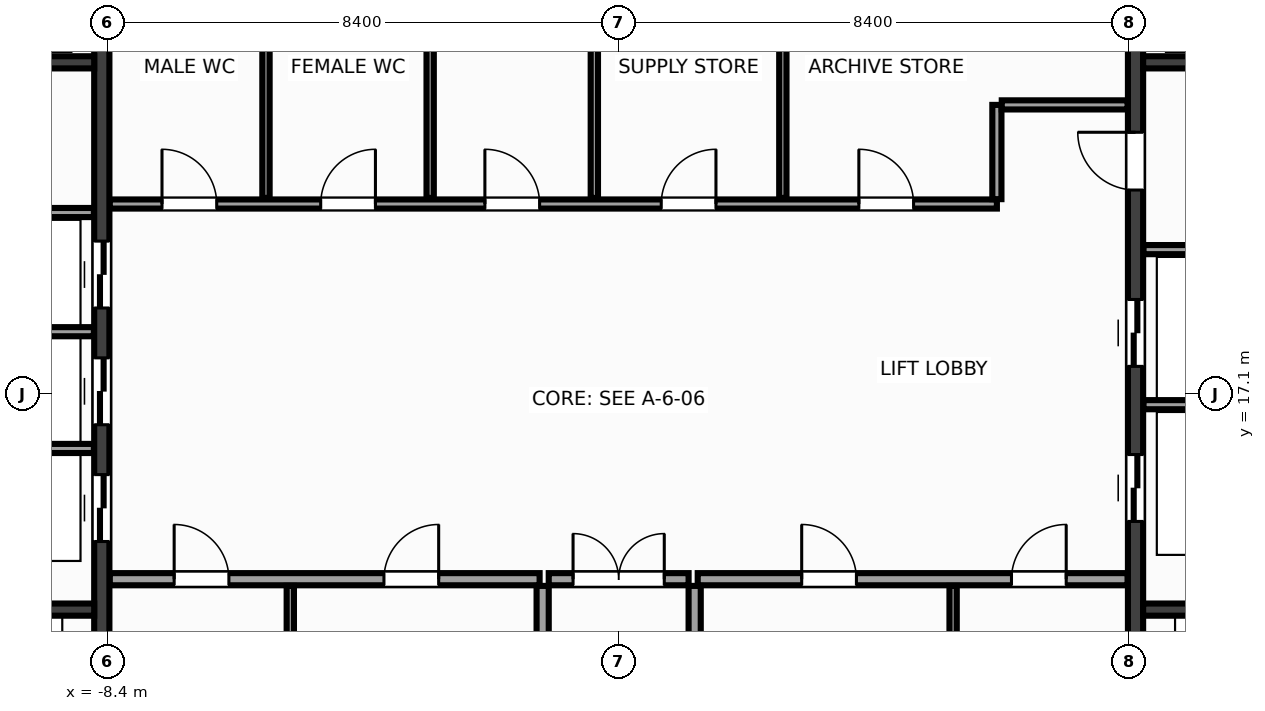
"""IFC4 building model, lengths in metres.
Left out: names, types, materials, properties, quantities, classifications, styles, units other than length and angle.
Written with IfcOpenShell. Run it as: python <this file> out.ifc"""

import sys

from ifc_helpers import new_model, si_unit, direction, frame, frame_2d, origin, place, context, subcontext, project, spatial, rectangle, extrude, source, transform, mapped, element, fill, save


model = new_model("IFC4")
c1 = context("Model", 3, precision=1e-05, world=origin(), true_north=direction((0.0, 1.0)))
c2 = subcontext(c1, "Body", "Model", "MODEL_VIEW")
j1 = project(units=[si_unit("LENGTHUNIT", "METRE"), si_unit("PLANEANGLEUNIT", "RADIAN")], contexts=[c1])
p1 = place(None, origin())
s1 = spatial("IfcSite", under=j1, at=p1, CompositionType="ELEMENT")
p2 = place(p1, origin())
s2 = spatial("IfcBuilding", under=s1, at=p2, CompositionType="ELEMENT")
p3 = place(p2, frame((0.0, 0.0, 286.4)))
s3 = spatial("IfcBuildingStorey", under=s2, at=p3, CompositionType="ELEMENT", Elevation=286.4)
m1 = source(origin(), c2, "Body", "SweptSolid", [
    extrude(rectangle(XDim=13.1, YDim=0.25, at=frame_2d((6.55, 0.0))), origin(), (0.0, 0.0, 1.0), 3.6),
])
p4 = place(p3, frame((-8.5, 10.45, 0.0), z_axis=(0.0, 0.0, 1.0), x_axis=(0.0, 1.0, 0.0)))
e1 = element("IfcWall", 1, at=p4, inside=s3, PredefinedType="SHEAR", context=c2, shape_type="MappedRepresentation", body=[
    mapped(m1, transform((0.0, 0.0, 0.0), x_axis=(1.0, 0.0, 0.0), y_axis=(0.0, 1.0, 0.0), z_axis=(0.0, 0.0, 1.0), scale=1.0)),
])
p5 = place(p4, frame((4.22, 0.0, 0.0)))
e2 = element("IfcOpeningElement", 2, at=p5, cuts=e1, PredefinedType="OPENING", context=c2, shape_type="SweptSolid", body=[
    extrude(rectangle(XDim=1.1, YDim=2.15, at=frame_2d((0.55, 1.075))), frame((0.0, 0.137, 0.0), z_axis=(0.0, -1.0, 0.0), x_axis=(1.0, 0.0, 0.0)), (0.0, 0.0, 1.0), 0.274),
])
p6 = place(p4, frame((6.14, 0.0, 0.0)))
e3 = element("IfcOpeningElement", 3, at=p6, cuts=e1, PredefinedType="OPENING", context=c2, shape_type="SweptSolid", body=[
    extrude(rectangle(XDim=1.1, YDim=2.15, at=frame_2d((0.55, 1.075))), frame((0.0, 0.137, 0.0), z_axis=(0.0, -1.0, 0.0), x_axis=(1.0, 0.0, 0.0)), (0.0, 0.0, 1.0), 0.274),
])
p7 = place(p4, frame((8.06, 0.0, 0.0)))
e4 = element("IfcOpeningElement", 4, at=p7, cuts=e1, PredefinedType="OPENING", context=c2, shape_type="SweptSolid", body=[
    extrude(rectangle(XDim=1.1, YDim=2.15, at=frame_2d((0.55, 1.075))), frame((0.0, 0.137, 0.0), z_axis=(0.0, -1.0, 0.0), x_axis=(1.0, 0.0, 0.0)), (0.0, 0.0, 1.0), 0.274),
])
p8 = place(p3, frame((8.5, 10.45, 0.0), z_axis=(0.0, 0.0, 1.0), x_axis=(0.0, 1.0, 0.0)))
e5 = element("IfcWall", 5, at=p8, inside=s3, PredefinedType="SHEAR", context=c2, shape_type="MappedRepresentation", body=[
    mapped(m1, transform((0.0, 0.0, 0.0), x_axis=(1.0, 0.0, 0.0), y_axis=(0.0, 1.0, 0.0), z_axis=(0.0, 0.0, 1.0), scale=1.0)),
])
p9 = place(p8, frame((4.55, 0.0, 0.0)))
e6 = element("IfcOpeningElement", 6, at=p9, cuts=e5, PredefinedType="OPENING", context=c2, shape_type="SweptSolid", body=[
    extrude(rectangle(XDim=1.1, YDim=2.15, at=frame_2d((0.55, 1.075))), frame((0.0, 0.137, 0.0), z_axis=(0.0, -1.0, 0.0), x_axis=(1.0, 0.0, 0.0)), (0.0, 0.0, 1.0), 0.274),
])
p10 = place(p8, frame((7.1, 0.0, 0.0)))
e7 = element("IfcOpeningElement", 7, at=p10, cuts=e5, PredefinedType="OPENING", context=c2, shape_type="SweptSolid", body=[
    extrude(rectangle(XDim=1.1, YDim=2.15, at=frame_2d((0.55, 1.075))), frame((0.0, 0.137, 0.0), z_axis=(0.0, -1.0, 0.0), x_axis=(1.0, 0.0, 0.0)), (0.0, 0.0, 1.0), 0.274),
])
p11 = place(p8, frame((10.0, 0.0, 0.0)))
e8 = element("IfcOpeningElement", 8, at=p11, cuts=e5, PredefinedType="OPENING", context=c2, shape_type="SweptSolid", body=[
    extrude(rectangle(XDim=0.95, YDim=2.15, at=frame_2d((0.475, 1.075))), frame((0.0, 0.137, 0.0), z_axis=(0.0, -1.0, 0.0), x_axis=(1.0, 0.0, 0.0)), (0.0, 0.0, 1.0), 0.274),
])
m2 = source(origin(), c2, "Body", "SweptSolid", [
    extrude(rectangle(XDim=2.825, YDim=0.2, at=frame_2d((1.413, 0.0))), origin(), (0.0, 0.0, 1.0), 3.6),
])
for number, where, z_axis, x_axis in (
    (9, (-11.45, 13.55, 0.0), (0.0, 0.0, 1.0), (1.0, 0.0, 0.0)),
    (10, (8.625, 13.55, 0.0), (0.0, 0.0, 1.0), (1.0, 0.0, 0.0)),
):
    element("IfcWall", number, at=place(p3, frame(where, z_axis=z_axis, x_axis=x_axis)), inside=s3, PredefinedType="SHEAR", context=c2, shape_type="MappedRepresentation", body=[
        mapped(m2, transform((0.0, 0.0, 0.0), x_axis=(1.0, 0.0, 0.0), y_axis=(0.0, 1.0, 0.0), z_axis=(0.0, 0.0, 1.0), scale=1.0)),
    ])
m3 = source(origin(), c2, "Body", "SweptSolid", [
    extrude(rectangle(XDim=3.02, YDim=0.2, at=frame_2d((1.51, 0.0))), origin(), (0.0, 0.0, 1.0), 3.6),
])
for number, where, z_axis, x_axis in (
    (11, (-11.645, 22.55, 0.0), (0.0, 0.0, 1.0), (1.0, 0.0, 0.0)),
    (12, (8.625, 22.55, 0.0), (0.0, 0.0, 1.0), (1.0, 0.0, 0.0)),
):
    element("IfcWall", number, at=place(p3, frame(where, z_axis=z_axis, x_axis=x_axis)), inside=s3, PredefinedType="SHEAR", context=c2, shape_type="MappedRepresentation", body=[
        mapped(m3, transform((0.0, 0.0, 0.0), x_axis=(1.0, 0.0, 0.0), y_axis=(0.0, 1.0, 0.0), z_axis=(0.0, 0.0, 1.0), scale=1.0)),
    ])
m4 = source(origin(), c2, "Body", "SweptSolid", [
    extrude(rectangle(XDim=3.01, YDim=0.15, at=frame_2d((1.505, 0.0))), origin(), (0.0, 0.0, 1.0), 3.37),
])
for number, where, z_axis, x_axis in (
    (13, (-11.64, 16.2, 0.0), (0.0, 0.0, 1.0), (1.0, 0.0, 0.0)),
    (14, (-11.64, 18.12, 0.0), (0.0, 0.0, 1.0), (1.0, 0.0, 0.0)),
    (15, (-11.64, 20.08, 0.0), (0.0, 0.0, 1.0), (1.0, 0.0, 0.0)),
    (16, (8.63, 16.92, 0.0), (0.0, 0.0, 1.0), (1.0, 0.0, 0.0)),
    (17, (8.63, 19.47, 0.0), (0.0, 0.0, 1.0), (1.0, 0.0, 0.0)),
):
    element("IfcWall", number, at=place(p3, frame(where, z_axis=z_axis, x_axis=x_axis)), inside=s3, PredefinedType="PARTITIONING", context=c2, shape_type="MappedRepresentation", body=[
        mapped(m4, transform((0.0, 0.0, 0.0), x_axis=(1.0, 0.0, 0.0), y_axis=(0.0, 1.0, 0.0), z_axis=(0.0, 0.0, 1.0), scale=1.0)),
    ])
m5 = source(origin(), c2, "Body", "SweptSolid", [
    extrude(rectangle(XDim=7.07, YDim=0.2, at=frame_2d((3.535, 0.0))), origin(), (0.0, 0.0, 1.0), 3.37),
])
p12 = place(p3, frame((-8.37, 14.05, 0.0), z_axis=(0.0, 0.0, 1.0), x_axis=(1.0, 0.0, 0.0)))
e18 = element("IfcWall", 18, at=p12, inside=s3, PredefinedType="PARTITIONING", context=c2, shape_type="MappedRepresentation", body=[
    mapped(m5, transform((0.0, 0.0, 0.0), x_axis=(1.0, 0.0, 0.0), y_axis=(0.0, 1.0, 0.0), z_axis=(0.0, 0.0, 1.0), scale=1.0)),
])
p13 = place(p12, frame((1.06, 0.0, 0.0)))
e19 = element("IfcOpeningElement", 19, at=p13, cuts=e18, PredefinedType="OPENING", context=c2, shape_type="SweptSolid", body=[
    extrude(rectangle(XDim=0.9, YDim=2.15, at=frame_2d((0.45, 1.075))), frame((0.0, 0.112, 0.0), z_axis=(0.0, -1.0, 0.0), x_axis=(1.0, 0.0, 0.0)), (0.0, 0.0, 1.0), 0.224),
])
p14 = place(p12, frame((4.51, 0.0, 0.0)))
e20 = element("IfcOpeningElement", 20, at=p14, cuts=e18, PredefinedType="OPENING", context=c2, shape_type="SweptSolid", body=[
    extrude(rectangle(XDim=0.9, YDim=2.15, at=frame_2d((0.45, 1.075))), frame((0.0, 0.112, 0.0), z_axis=(0.0, -1.0, 0.0), x_axis=(1.0, 0.0, 0.0)), (0.0, 0.0, 1.0), 0.224),
])
p15 = place(p3, frame((1.3, 14.05, 0.0), z_axis=(0.0, 0.0, 1.0), x_axis=(1.0, 0.0, 0.0)))
e21 = element("IfcWall", 21, at=p15, inside=s3, PredefinedType="PARTITIONING", context=c2, shape_type="MappedRepresentation", body=[
    mapped(m5, transform((0.0, 0.0, 0.0), x_axis=(1.0, 0.0, 0.0), y_axis=(0.0, 1.0, 0.0), z_axis=(0.0, 0.0, 1.0), scale=1.0)),
])
p16 = place(p15, frame((1.71, 0.0, 0.0)))
e22 = element("IfcOpeningElement", 22, at=p16, cuts=e21, PredefinedType="OPENING", context=c2, shape_type="SweptSolid", body=[
    extrude(rectangle(XDim=0.9, YDim=2.15, at=frame_2d((0.45, 1.075))), frame((0.0, 0.112, 0.0), z_axis=(0.0, -1.0, 0.0), x_axis=(1.0, 0.0, 0.0)), (0.0, 0.0, 1.0), 0.224),
])
p17 = place(p15, frame((5.16, 0.0, 0.0)))
e23 = element("IfcOpeningElement", 23, at=p17, cuts=e21, PredefinedType="OPENING", context=c2, shape_type="SweptSolid", body=[
    extrude(rectangle(XDim=0.9, YDim=2.15, at=frame_2d((0.45, 1.075))), frame((0.0, 0.112, 0.0), z_axis=(0.0, -1.0, 0.0), x_axis=(1.0, 0.0, 0.0)), (0.0, 0.0, 1.0), 0.224),
])
m6 = source(origin(), c2, "Body", "SweptSolid", [
    extrude(rectangle(XDim=3.49, YDim=0.2, at=frame_2d((1.745, 0.0))), origin(), (0.0, 0.0, 1.0), 3.37),
])
for number, where, z_axis, x_axis in (
    (24, (-1.25, 10.45, 0.0), (0.0, 0.0, 1.0), (0.0, 1.0, 0.0)),
    (25, (1.25, 10.45, 0.0), (0.0, 0.0, 1.0), (0.0, 1.0, 0.0)),
):
    element("IfcWall", number, at=place(p3, frame(where, z_axis=z_axis, x_axis=x_axis)), inside=s3, PredefinedType="PARTITIONING", context=c2, shape_type="MappedRepresentation", body=[
        mapped(m6, transform((0.0, 0.0, 0.0), x_axis=(1.0, 0.0, 0.0), y_axis=(0.0, 1.0, 0.0), z_axis=(0.0, 0.0, 1.0), scale=1.0)),
    ])
m7 = source(origin(), c2, "Body", "SweptSolid", [
    extrude(rectangle(XDim=2.3, YDim=0.2, at=frame_2d((1.15, 0.0))), origin(), (0.0, 0.0, 1.0), 3.37),
])
p18 = place(p3, frame((-1.15, 14.05, 0.0), z_axis=(0.0, 0.0, 1.0), x_axis=(1.0, 0.0, 0.0)))
e26 = element("IfcWall", 26, at=p18, inside=s3, PredefinedType="PARTITIONING", context=c2, shape_type="MappedRepresentation", body=[
    mapped(m7, transform((0.0, 0.0, 0.0), x_axis=(1.0, 0.0, 0.0), y_axis=(0.0, 1.0, 0.0), z_axis=(0.0, 0.0, 1.0), scale=1.0)),
])
p19 = place(p18, frame((0.4, 0.0, 0.0)))
e27 = element("IfcOpeningElement", 27, at=p19, cuts=e26, PredefinedType="OPENING", context=c2, shape_type="SweptSolid", body=[
    extrude(rectangle(XDim=1.5, YDim=2.2, at=frame_2d((0.75, 1.1))), frame((0.0, 0.112, 0.0), z_axis=(0.0, -1.0, 0.0), x_axis=(1.0, 0.0, 0.0)), (0.0, 0.0, 1.0), 0.224),
])
m8 = source(origin(), c2, "Body", "SweptSolid", [
    extrude(rectangle(XDim=14.59, YDim=0.15, at=frame_2d((7.295, 0.0))), origin(), (0.0, 0.0, 1.0), 3.37),
])
p20 = place(p3, frame((-8.37, 20.22, 0.0), z_axis=(0.0, 0.0, 1.0), x_axis=(1.0, 0.0, 0.0)))
e28 = element("IfcWall", 28, at=p20, inside=s3, PredefinedType="PARTITIONING", context=c2, shape_type="MappedRepresentation", body=[
    mapped(m8, transform((0.0, 0.0, 0.0), x_axis=(1.0, 0.0, 0.0), y_axis=(0.0, 1.0, 0.0), z_axis=(0.0, 0.0, 1.0), scale=1.0)),
])
p21 = place(p20, frame((0.86, 0.0, 0.0)))
e29 = element("IfcOpeningElement", 29, at=p21, cuts=e28, PredefinedType="OPENING", context=c2, shape_type="SweptSolid", body=[
    extrude(rectangle(XDim=0.9, YDim=2.15, at=frame_2d((0.45, 1.075))), frame((0.0, 0.087, 0.0), z_axis=(0.0, -1.0, 0.0), x_axis=(1.0, 0.0, 0.0)), (0.0, 0.0, 1.0), 0.174),
])
p22 = place(p20, frame((3.47, 0.0, 0.0)))
e30 = element("IfcOpeningElement", 30, at=p22, cuts=e28, PredefinedType="OPENING", context=c2, shape_type="SweptSolid", body=[
    extrude(rectangle(XDim=0.9, YDim=2.15, at=frame_2d((0.45, 1.075))), frame((0.0, 0.087, 0.0), z_axis=(0.0, -1.0, 0.0), x_axis=(1.0, 0.0, 0.0)), (0.0, 0.0, 1.0), 0.174),
])
p23 = place(p20, frame((6.17, 0.0, 0.0)))
e31 = element("IfcOpeningElement", 31, at=p23, cuts=e28, PredefinedType="OPENING", context=c2, shape_type="SweptSolid", body=[
    extrude(rectangle(XDim=0.9, YDim=2.15, at=frame_2d((0.45, 1.075))), frame((0.0, 0.087, 0.0), z_axis=(0.0, -1.0, 0.0), x_axis=(1.0, 0.0, 0.0)), (0.0, 0.0, 1.0), 0.174),
])
p24 = place(p20, frame((9.07, 0.0, 0.0)))
e32 = element("IfcOpeningElement", 32, at=p24, cuts=e28, PredefinedType="OPENING", context=c2, shape_type="SweptSolid", body=[
    extrude(rectangle(XDim=0.9, YDim=2.15, at=frame_2d((0.45, 1.075))), frame((0.0, 0.087, 0.0), z_axis=(0.0, -1.0, 0.0), x_axis=(1.0, 0.0, 0.0)), (0.0, 0.0, 1.0), 0.174),
])
p25 = place(p20, frame((12.32, 0.0, 0.0)))
e33 = element("IfcOpeningElement", 33, at=p25, cuts=e28, PredefinedType="OPENING", context=c2, shape_type="SweptSolid", body=[
    extrude(rectangle(XDim=0.9, YDim=2.15, at=frame_2d((0.45, 1.075))), frame((0.0, 0.087, 0.0), z_axis=(0.0, -1.0, 0.0), x_axis=(1.0, 0.0, 0.0)), (0.0, 0.0, 1.0), 0.174),
])
m9 = source(origin(), c2, "Body", "SweptSolid", [
    extrude(rectangle(XDim=1.55, YDim=0.15, at=frame_2d((0.775, 0.0))), origin(), (0.0, 0.0, 1.0), 3.37),
])
p26 = place(p3, frame((6.22, 20.3, 0.0), z_axis=(0.0, 0.0, 1.0), x_axis=(0.0, 1.0, 0.0)))
e34 = element("IfcWall", 34, at=p26, inside=s3, PredefinedType="PARTITIONING", context=c2, shape_type="MappedRepresentation", body=[
    mapped(m9, transform((0.0, 0.0, 0.0), x_axis=(1.0, 0.0, 0.0), y_axis=(0.0, 1.0, 0.0), z_axis=(0.0, 0.0, 1.0), scale=1.0)),
])
m10 = source(origin(), c2, "Body", "SweptSolid", [
    extrude(rectangle(XDim=2.07, YDim=0.15, at=frame_2d((1.035, 0.0))), origin(), (0.0, 0.0, 1.0), 3.37),
])
p27 = place(p3, frame((6.3, 21.85, 0.0), z_axis=(0.0, 0.0, 1.0), x_axis=(1.0, 0.0, 0.0)))
e35 = element("IfcWall", 35, at=p27, inside=s3, PredefinedType="PARTITIONING", context=c2, shape_type="MappedRepresentation", body=[
    mapped(m10, transform((0.0, 0.0, 0.0), x_axis=(1.0, 0.0, 0.0), y_axis=(0.0, 1.0, 0.0), z_axis=(0.0, 0.0, 1.0), scale=1.0)),
])
m11 = source(origin(), c2, "Body", "SweptSolid", [
    extrude(rectangle(XDim=3.49, YDim=0.12, at=frame_2d((1.745, 0.0))), origin(), (0.0, 0.0, 1.0), 3.37),
])
for number, where, z_axis, x_axis in (
    (36, (-5.4, 10.45, 0.0), (0.0, 0.0, 1.0), (0.0, 1.0, 0.0)),
    (37, (5.5, 10.45, 0.0), (0.0, 0.0, 1.0), (0.0, 1.0, 0.0)),
):
    element("IfcWall", number, at=place(p3, frame(where, z_axis=z_axis, x_axis=x_axis)), inside=s3, PredefinedType="PARTITIONING", context=c2, shape_type="MappedRepresentation", body=[
        mapped(m11, transform((0.0, 0.0, 0.0), x_axis=(1.0, 0.0, 0.0), y_axis=(0.0, 1.0, 0.0), z_axis=(0.0, 0.0, 1.0), scale=1.0)),
    ])
m12 = source(origin(), c2, "Body", "SweptSolid", [
    extrude(rectangle(XDim=3.19, YDim=0.12, at=frame_2d((1.595, 0.0))), origin(), (0.0, 0.0, 1.0), 3.37),
])
for number, where, z_axis, x_axis in (
    (38, (-5.8, 20.32, 0.0), (0.0, 0.0, 1.0), (0.0, 1.0, 0.0)),
    (39, (-3.1, 20.32, 0.0), (0.0, 0.0, 1.0), (0.0, 1.0, 0.0)),
    (40, (-0.4, 20.32, 0.0), (0.0, 0.0, 1.0), (0.0, 1.0, 0.0)),
    (41, (2.7, 20.32, 0.0), (0.0, 0.0, 1.0), (0.0, 1.0, 0.0)),
):
    element("IfcWall", number, at=place(p3, frame(where, z_axis=z_axis, x_axis=x_axis)), inside=s3, PredefinedType="PARTITIONING", context=c2, shape_type="MappedRepresentation", body=[
        mapped(m12, transform((0.0, 0.0, 0.0), x_axis=(1.0, 0.0, 0.0), y_axis=(0.0, 1.0, 0.0), z_axis=(0.0, 0.0, 1.0), scale=1.0)),
    ])
m13 = source(origin(), c2, "Body", "SweptSolid", [
    extrude(rectangle(XDim=1.1, YDim=2.15, at=frame_2d((0.55, 1.075))), frame((0.0, 0.025, 0.0), z_axis=(0.0, -1.0, 0.0), x_axis=(1.0, 0.0, 0.0)), (0.0, 0.0, 1.0), 0.05),
])
p28 = place(p5, origin())
e42 = element("IfcDoor", 42, at=p28, inside=s3, OperationType="DOUBLE_DOOR_SLIDING", PredefinedType="DOOR", context=c2, shape_type="MappedRepresentation", body=[
    mapped(m13, transform((0.0, 0.0, 0.0), x_axis=(1.0, 0.0, 0.0), y_axis=(0.0, 1.0, 0.0), z_axis=(0.0, 0.0, 1.0), scale=1.0)),
])
fill(e2, e42)
p29 = place(p6, origin())
e43 = element("IfcDoor", 43, at=p29, inside=s3, OperationType="DOUBLE_DOOR_SLIDING", PredefinedType="DOOR", context=c2, shape_type="MappedRepresentation", body=[
    mapped(m13, transform((0.0, 0.0, 0.0), x_axis=(1.0, 0.0, 0.0), y_axis=(0.0, 1.0, 0.0), z_axis=(0.0, 0.0, 1.0), scale=1.0)),
])
fill(e3, e43)
p30 = place(p7, origin())
e44 = element("IfcDoor", 44, at=p30, inside=s3, OperationType="DOUBLE_DOOR_SLIDING", PredefinedType="DOOR", context=c2, shape_type="MappedRepresentation", body=[
    mapped(m13, transform((0.0, 0.0, 0.0), x_axis=(1.0, 0.0, 0.0), y_axis=(0.0, 1.0, 0.0), z_axis=(0.0, 0.0, 1.0), scale=1.0)),
])
fill(e4, e44)
p31 = place(p9, origin())
e45 = element("IfcDoor", 45, at=p31, inside=s3, OperationType="DOUBLE_DOOR_SLIDING", PredefinedType="DOOR", context=c2, shape_type="MappedRepresentation", body=[
    mapped(m13, transform((0.0, 0.0, 0.0), x_axis=(1.0, 0.0, 0.0), y_axis=(0.0, 1.0, 0.0), z_axis=(0.0, 0.0, 1.0), scale=1.0)),
])
fill(e6, e45)
p32 = place(p10, origin())
e46 = element("IfcDoor", 46, at=p32, inside=s3, OperationType="DOUBLE_DOOR_SLIDING", PredefinedType="DOOR", context=c2, shape_type="MappedRepresentation", body=[
    mapped(m13, transform((0.0, 0.0, 0.0), x_axis=(1.0, 0.0, 0.0), y_axis=(0.0, 1.0, 0.0), z_axis=(0.0, 0.0, 1.0), scale=1.0)),
])
fill(e7, e46)
m14 = source(origin(), c2, "Body", "SweptSolid", [
    extrude(rectangle(XDim=0.95, YDim=2.15, at=frame_2d((0.475, 1.075))), frame((0.0, 0.025, 0.0), z_axis=(0.0, -1.0, 0.0), x_axis=(1.0, 0.0, 0.0)), (0.0, 0.0, 1.0), 0.05),
])
p33 = place(p11, origin())
e47 = element("IfcDoor", 47, at=p33, inside=s3, OperationType="SINGLE_SWING_RIGHT", PredefinedType="DOOR", context=c2, shape_type="MappedRepresentation", body=[
    mapped(m14, transform((0.0, 0.0, 0.0), x_axis=(1.0, 0.0, 0.0), y_axis=(0.0, 1.0, 0.0), z_axis=(0.0, 0.0, 1.0), scale=1.0)),
])
fill(e8, e47)
m15 = source(origin(), c2, "Body", "SweptSolid", [
    extrude(rectangle(XDim=0.9, YDim=2.15, at=frame_2d((0.45, 1.075))), frame((0.0, 0.025, 0.0), z_axis=(0.0, -1.0, 0.0), x_axis=(1.0, 0.0, 0.0)), (0.0, 0.0, 1.0), 0.05),
])
p34 = place(p13, origin())
e48 = element("IfcDoor", 48, at=p34, inside=s3, OperationType="SINGLE_SWING_LEFT", PredefinedType="DOOR", context=c2, shape_type="MappedRepresentation", body=[
    mapped(m15, transform((0.0, 0.0, 0.0), x_axis=(1.0, 0.0, 0.0), y_axis=(0.0, 1.0, 0.0), z_axis=(0.0, 0.0, 1.0), scale=1.0)),
])
fill(e19, e48)
p35 = place(p14, origin())
e49 = element("IfcDoor", 49, at=p35, inside=s3, OperationType="SINGLE_SWING_RIGHT", PredefinedType="DOOR", context=c2, shape_type="MappedRepresentation", body=[
    mapped(m15, transform((0.0, 0.0, 0.0), x_axis=(1.0, 0.0, 0.0), y_axis=(0.0, 1.0, 0.0), z_axis=(0.0, 0.0, 1.0), scale=1.0)),
])
fill(e20, e49)
p36 = place(p16, origin())
e50 = element("IfcDoor", 50, at=p36, inside=s3, OperationType="SINGLE_SWING_LEFT", PredefinedType="DOOR", context=c2, shape_type="MappedRepresentation", body=[
    mapped(m15, transform((0.0, 0.0, 0.0), x_axis=(1.0, 0.0, 0.0), y_axis=(0.0, 1.0, 0.0), z_axis=(0.0, 0.0, 1.0), scale=1.0)),
])
fill(e22, e50)
p37 = place(p17, origin())
e51 = element("IfcDoor", 51, at=p37, inside=s3, OperationType="SINGLE_SWING_RIGHT", PredefinedType="DOOR", context=c2, shape_type="MappedRepresentation", body=[
    mapped(m15, transform((0.0, 0.0, 0.0), x_axis=(1.0, 0.0, 0.0), y_axis=(0.0, 1.0, 0.0), z_axis=(0.0, 0.0, 1.0), scale=1.0)),
])
fill(e23, e51)
m16 = source(origin(), c2, "Body", "SweptSolid", [
    extrude(rectangle(XDim=1.5, YDim=2.2, at=frame_2d((0.75, 1.1))), frame((0.0, 0.025, 0.0), z_axis=(0.0, -1.0, 0.0), x_axis=(1.0, 0.0, 0.0)), (0.0, 0.0, 1.0), 0.05),
])
p38 = place(p19, origin())
e52 = element("IfcDoor", 52, at=p38, inside=s3, OperationType="DOUBLE_DOOR_SINGLE_SWING", PredefinedType="DOOR", context=c2, shape_type="MappedRepresentation", body=[
    mapped(m16, transform((0.0, 0.0, 0.0), x_axis=(1.0, 0.0, 0.0), y_axis=(0.0, 1.0, 0.0), z_axis=(0.0, 0.0, 1.0), scale=1.0)),
])
fill(e27, e52)
p39 = place(p21, origin())
e53 = element("IfcDoor", 53, at=p39, inside=s3, OperationType="SINGLE_SWING_LEFT", PredefinedType="DOOR", context=c2, shape_type="MappedRepresentation", body=[
    mapped(m15, transform((0.0, 0.0, 0.0), x_axis=(1.0, 0.0, 0.0), y_axis=(0.0, 1.0, 0.0), z_axis=(0.0, 0.0, 1.0), scale=1.0)),
])
fill(e29, e53)
p40 = place(p22, origin())
e54 = element("IfcDoor", 54, at=p40, inside=s3, OperationType="SINGLE_SWING_RIGHT", PredefinedType="DOOR", context=c2, shape_type="MappedRepresentation", body=[
    mapped(m15, transform((0.0, 0.0, 0.0), x_axis=(1.0, 0.0, 0.0), y_axis=(0.0, 1.0, 0.0), z_axis=(0.0, 0.0, 1.0), scale=1.0)),
])
fill(e30, e54)
p41 = place(p23, origin())
e55 = element("IfcDoor", 55, at=p41, inside=s3, OperationType="SINGLE_SWING_LEFT", PredefinedType="DOOR", context=c2, shape_type="MappedRepresentation", body=[
    mapped(m15, transform((0.0, 0.0, 0.0), x_axis=(1.0, 0.0, 0.0), y_axis=(0.0, 1.0, 0.0), z_axis=(0.0, 0.0, 1.0), scale=1.0)),
])
fill(e31, e55)
p42 = place(p24, origin())
e56 = element("IfcDoor", 56, at=p42, inside=s3, OperationType="SINGLE_SWING_RIGHT", PredefinedType="DOOR", context=c2, shape_type="MappedRepresentation", body=[
    mapped(m15, transform((0.0, 0.0, 0.0), x_axis=(1.0, 0.0, 0.0), y_axis=(0.0, 1.0, 0.0), z_axis=(0.0, 0.0, 1.0), scale=1.0)),
])
fill(e32, e56)
p43 = place(p25, origin())
e57 = element("IfcDoor", 57, at=p43, inside=s3, OperationType="SINGLE_SWING_LEFT", PredefinedType="DOOR", context=c2, shape_type="MappedRepresentation", body=[
    mapped(m15, transform((0.0, 0.0, 0.0), x_axis=(1.0, 0.0, 0.0), y_axis=(0.0, 1.0, 0.0), z_axis=(0.0, 0.0, 1.0), scale=1.0)),
])
fill(e33, e57)
save(model, sys.argv[1])
